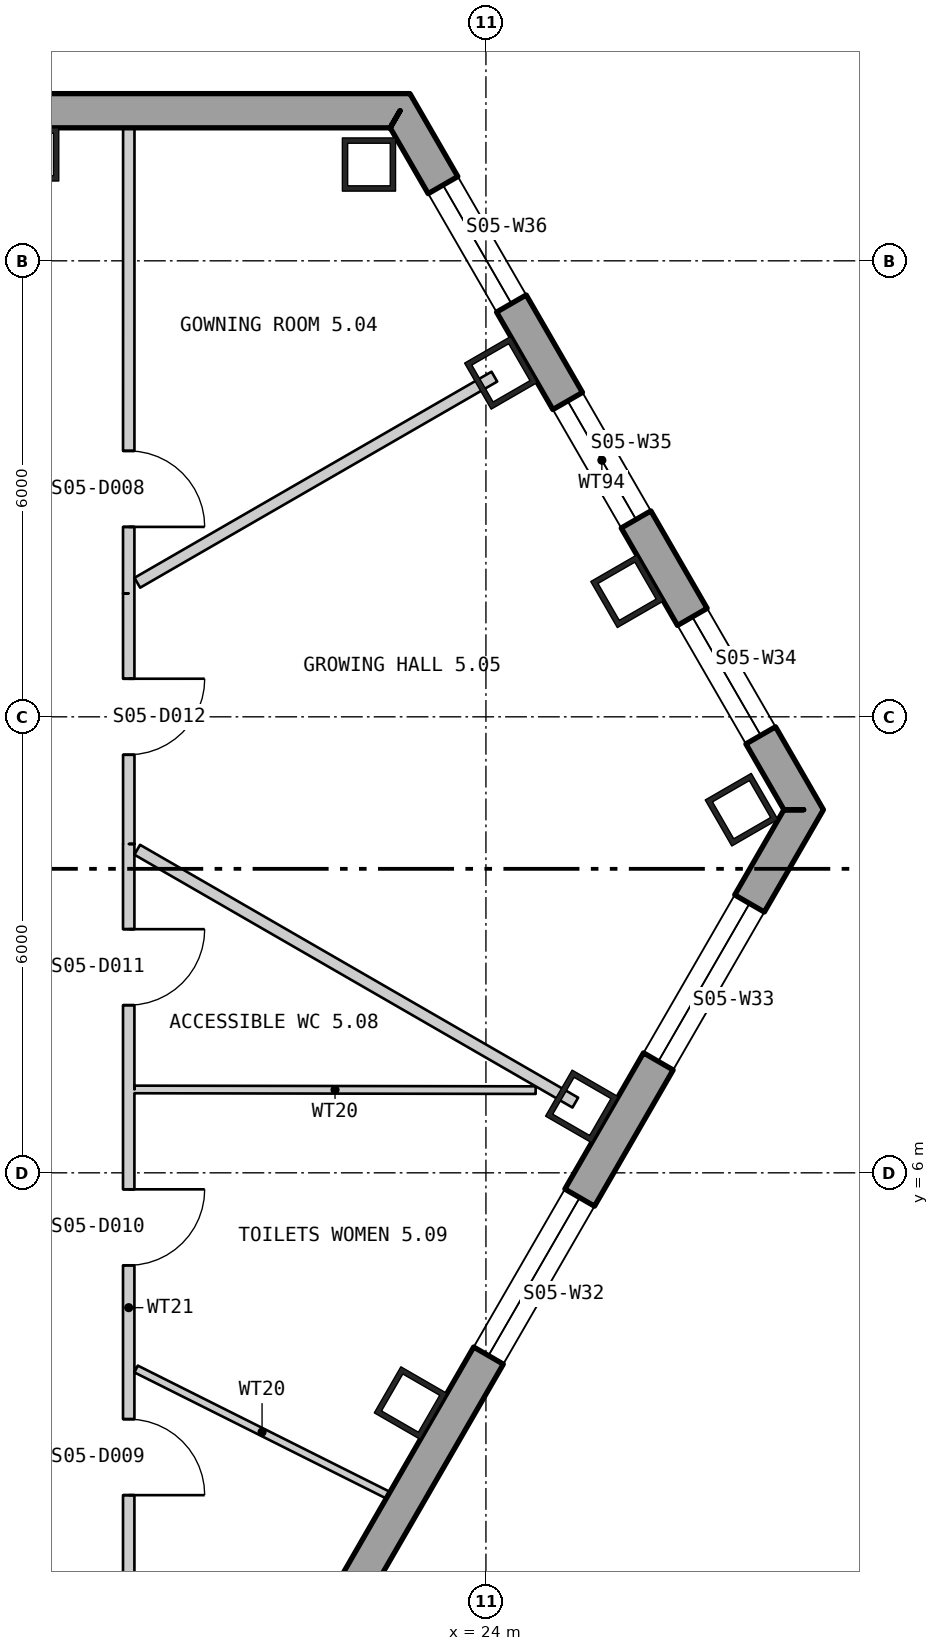
"""IFC4 building model, lengths in metres.
Left out: names, types, materials, properties, quantities, classifications, styles, units other than length and angle.
Written with IfcOpenShell. Run it as: python <this file> out.ifc"""

import sys

from ifc_helpers import new_model, si_unit, direction, frame, frame_2d, origin, origin_2d, place, context, subcontext, project, spatial, polyline, rectangle, hollow_rectangle, outline, extrude, element, fill, save


model = new_model("IFC4")
c1 = context("Model", 3, precision=1e-05, world=origin(), true_north=direction((0.0, 1.0)))
c2 = subcontext(c1, "Body", "Model", "MODEL_VIEW")
j1 = project(units=[si_unit("LENGTHUNIT", "METRE"), si_unit("PLANEANGLEUNIT", "RADIAN")], contexts=[c1])
p1 = place(None, origin())
s1 = spatial("IfcSite", under=j1, at=p1, CompositionType="ELEMENT")
p2 = place(p1, origin())
s2 = spatial("IfcBuilding", under=s1, at=p2, CompositionType="ELEMENT")
p3 = place(p2, frame((0.0, 0.0, 69.3)))
s3 = spatial("IfcBuildingStorey", under=s2, at=p3, CompositionType="ELEMENT", Elevation=69.3)
for number, where, z_axis, x_axis in (
    (1, (22.461, 19.267, 0.0), (0.0, 0.0, 1.0), (-1.0, 0.0, 0.0)),
    (2, (18.03, 19.4, 0.0), (0.0, 0.0, 1.0), (-1.0, 0.0, 0.0)),
    (3, (23.009, 2.97, 0.0), (0.0, 0.0, 1.0), (0.5, 0.866, 0.0)),
    (4, (25.262, 6.874, 0.0), (0.0, 0.0, 1.0), (0.5, 0.866, 0.0)),
    (5, (27.363, 10.778, 0.0), (0.0, 0.0, 1.0), (-0.5, 0.866, 0.0)),
    (6, (25.857, 13.652, 0.0), (0.0, 0.0, 1.0), (-0.5, 0.866, 0.0)),
    (7, (24.197, 16.526, 0.0), (0.0, 0.0, 1.0), (-0.5, 0.866, 0.0)),
):
    element("IfcColumn", number, at=place(p3, frame(where, z_axis=z_axis, x_axis=x_axis)), inside=s3, PredefinedType="COLUMN", context=c2, shape_type="SweptSolid", body=[
        extrude(hollow_rectangle(XDim=0.7, YDim=0.7, WallThickness=0.07, at=origin_2d()), origin(), (0.0, 0.0, 1.0), 4.5),
    ])
p4 = place(p3, frame((22.87, 19.975, -0.4), z_axis=(0.0, 0.0, 1.0), x_axis=(-1.0, 0.0, 0.0)))
e8 = element("IfcWall", 8, at=p4, inside=s3, PredefinedType="SOLIDWALL", context=c2, shape_type="SweptSolid", body=[
    extrude(outline(polyline([(-0.13, -0.225), (45.87, -0.225), (45.61, 0.225), (0.13, 0.225), (-0.13, -0.225)])), origin(), (0.0, 0.0, 1.0), 4.5),
])
p5 = place(p4, frame((5.893, 0.0, 1.3)))
e9 = element("IfcOpeningElement", 9, at=p5, cuts=e8, PredefinedType="OPENING", context=c2, shape_type="SweptSolid", body=[
    extrude(rectangle(XDim=2.4, YDim=2.6, at=frame_2d((1.2, 1.3))), frame((0.0, 0.235, 0.0), z_axis=(0.0, -1.0, 0.0), x_axis=(1.0, 0.0, 0.0)), (0.0, 0.0, 1.0), 0.47),
])
p6 = place(p4, frame((10.401, 0.0, 1.3)))
e10 = element("IfcOpeningElement", 10, at=p6, cuts=e8, PredefinedType="OPENING", context=c2, shape_type="SweptSolid", body=[
    extrude(rectangle(XDim=2.4, YDim=2.6, at=frame_2d((1.2, 1.3))), frame((0.0, 0.235, 0.0), z_axis=(0.0, -1.0, 0.0), x_axis=(1.0, 0.0, 0.0)), (0.0, 0.0, 1.0), 0.47),
])
p7 = place(p4, frame((14.909, 0.0, 1.3)))
e11 = element("IfcOpeningElement", 11, at=p7, cuts=e8, PredefinedType="OPENING", context=c2, shape_type="SweptSolid", body=[
    extrude(rectangle(XDim=2.4, YDim=2.6, at=frame_2d((1.2, 1.3))), frame((0.0, 0.235, 0.0), z_axis=(0.0, -1.0, 0.0), x_axis=(1.0, 0.0, 0.0)), (0.0, 0.0, 1.0), 0.47),
])
p8 = place(p4, frame((19.416, 0.0, 1.3)))
e12 = element("IfcOpeningElement", 12, at=p8, cuts=e8, PredefinedType="OPENING", context=c2, shape_type="SweptSolid", body=[
    extrude(rectangle(XDim=2.4, YDim=2.6, at=frame_2d((1.2, 1.3))), frame((0.0, 0.235, 0.0), z_axis=(0.0, -1.0, 0.0), x_axis=(1.0, 0.0, 0.0)), (0.0, 0.0, 1.0), 0.47),
])
p9 = place(p4, frame((23.924, 0.0, 1.3)))
e13 = element("IfcOpeningElement", 13, at=p9, cuts=e8, PredefinedType="OPENING", context=c2, shape_type="SweptSolid", body=[
    extrude(rectangle(XDim=2.4, YDim=2.6, at=frame_2d((1.2, 1.3))), frame((0.0, 0.235, 0.0), z_axis=(0.0, -1.0, 0.0), x_axis=(1.0, 0.0, 0.0)), (0.0, 0.0, 1.0), 0.47),
])
p10 = place(p4, frame((28.431, 0.0, 1.3)))
e14 = element("IfcOpeningElement", 14, at=p10, cuts=e8, PredefinedType="OPENING", context=c2, shape_type="SweptSolid", body=[
    extrude(rectangle(XDim=2.4, YDim=2.6, at=frame_2d((1.2, 1.3))), frame((0.0, 0.235, 0.0), z_axis=(0.0, -1.0, 0.0), x_axis=(1.0, 0.0, 0.0)), (0.0, 0.0, 1.0), 0.47),
])
p11 = place(p4, frame((32.939, 0.0, 1.3)))
e15 = element("IfcOpeningElement", 15, at=p11, cuts=e8, PredefinedType="OPENING", context=c2, shape_type="SweptSolid", body=[
    extrude(rectangle(XDim=2.4, YDim=2.6, at=frame_2d((1.2, 1.3))), frame((0.0, 0.235, 0.0), z_axis=(0.0, -1.0, 0.0), x_axis=(1.0, 0.0, 0.0)), (0.0, 0.0, 1.0), 0.47),
])
p12 = place(p4, frame((37.447, 0.0, 1.3)))
e16 = element("IfcOpeningElement", 16, at=p12, cuts=e8, PredefinedType="OPENING", context=c2, shape_type="SweptSolid", body=[
    extrude(rectangle(XDim=2.4, YDim=2.6, at=frame_2d((1.2, 1.3))), frame((0.0, 0.235, 0.0), z_axis=(0.0, -1.0, 0.0), x_axis=(1.0, 0.0, 0.0)), (0.0, 0.0, 1.0), 0.47),
])
p13 = place(p3, frame((5.31, -28.834, -0.18), z_axis=(0.0, 0.0, 1.0), x_axis=(0.500000711659, 0.866024992908, 0.0)))
e17 = element("IfcWall", 17, at=p13, inside=s3, PredefinedType="SOLIDWALL", context=c2, shape_type="SweptSolid", body=[
    extrude(outline(polyline([(-0.13, -0.225), (45.87, -0.225), (45.61, 0.225), (0.13, 0.225), (-0.13, -0.225)])), origin(), (0.0, 0.0, 1.0), 4.28),
])
p14 = place(p13, frame((1.424, 0.0, 1.08)))
e18 = element("IfcOpeningElement", 18, at=p14, cuts=e17, PredefinedType="OPENING", context=c2, shape_type="SweptSolid", body=[
    extrude(rectangle(XDim=2.4, YDim=2.6, at=frame_2d((1.2, 1.3))), frame((0.0, 0.235, 0.0), z_axis=(0.0, -1.0, 0.0), x_axis=(1.0, 0.0, 0.0)), (0.0, 0.0, 1.0), 0.47),
])
p15 = place(p13, frame((5.893, 0.0, 1.08)))
e19 = element("IfcOpeningElement", 19, at=p15, cuts=e17, PredefinedType="OPENING", context=c2, shape_type="SweptSolid", body=[
    extrude(rectangle(XDim=2.4, YDim=2.6, at=frame_2d((1.2, 1.3))), frame((0.0, 0.235, 0.0), z_axis=(0.0, -1.0, 0.0), x_axis=(1.0, 0.0, 0.0)), (0.0, 0.0, 1.0), 0.47),
])
p16 = place(p13, frame((10.401, 0.0, 1.08)))
e20 = element("IfcOpeningElement", 20, at=p16, cuts=e17, PredefinedType="OPENING", context=c2, shape_type="SweptSolid", body=[
    extrude(rectangle(XDim=2.4, YDim=2.6, at=frame_2d((1.2, 1.3))), frame((0.0, 0.235, 0.0), z_axis=(0.0, -1.0, 0.0), x_axis=(1.0, 0.0, 0.0)), (0.0, 0.0, 1.0), 0.47),
])
p17 = place(p13, frame((14.909, 0.0, 1.08)))
e21 = element("IfcOpeningElement", 21, at=p17, cuts=e17, PredefinedType="OPENING", context=c2, shape_type="SweptSolid", body=[
    extrude(rectangle(XDim=2.4, YDim=2.6, at=frame_2d((1.2, 1.3))), frame((0.0, 0.235, 0.0), z_axis=(0.0, -1.0, 0.0), x_axis=(1.0, 0.0, 0.0)), (0.0, 0.0, 1.0), 0.47),
])
p18 = place(p13, frame((19.416, 0.0, 1.08)))
e22 = element("IfcOpeningElement", 22, at=p18, cuts=e17, PredefinedType="OPENING", context=c2, shape_type="SweptSolid", body=[
    extrude(rectangle(XDim=2.4, YDim=2.6, at=frame_2d((1.2, 1.3))), frame((0.0, 0.235, 0.0), z_axis=(0.0, -1.0, 0.0), x_axis=(1.0, 0.0, 0.0)), (0.0, 0.0, 1.0), 0.47),
])
p19 = place(p13, frame((23.924, 0.0, 1.08)))
e23 = element("IfcOpeningElement", 23, at=p19, cuts=e17, PredefinedType="OPENING", context=c2, shape_type="SweptSolid", body=[
    extrude(rectangle(XDim=2.4, YDim=2.6, at=frame_2d((1.2, 1.3))), frame((0.0, 0.235, 0.0), z_axis=(0.0, -1.0, 0.0), x_axis=(1.0, 0.0, 0.0)), (0.0, 0.0, 1.0), 0.47),
])
p20 = place(p13, frame((28.431, 0.0, 1.08)))
e24 = element("IfcOpeningElement", 24, at=p20, cuts=e17, PredefinedType="OPENING", context=c2, shape_type="SweptSolid", body=[
    extrude(rectangle(XDim=2.4, YDim=2.6, at=frame_2d((1.2, 1.3))), frame((0.0, 0.235, 0.0), z_axis=(0.0, -1.0, 0.0), x_axis=(1.0, 0.0, 0.0)), (0.0, 0.0, 1.0), 0.47),
])
p21 = place(p13, frame((37.447, 0.0, 1.08)))
e25 = element("IfcOpeningElement", 25, at=p21, cuts=e17, PredefinedType="OPENING", context=c2, shape_type="SweptSolid", body=[
    extrude(rectangle(XDim=2.4, YDim=2.6, at=frame_2d((1.2, 1.3))), frame((0.0, 0.235, 0.0), z_axis=(0.0, -1.0, 0.0), x_axis=(1.0, 0.0, 0.0)), (0.0, 0.0, 1.0), 0.47),
])
p22 = place(p13, frame((41.916, 0.0, 1.08)))
e26 = element("IfcOpeningElement", 26, at=p22, cuts=e17, PredefinedType="OPENING", context=c2, shape_type="SweptSolid", body=[
    extrude(rectangle(XDim=2.4, YDim=2.6, at=frame_2d((1.2, 1.3))), frame((0.0, 0.235, 0.0), z_axis=(0.0, -1.0, 0.0), x_axis=(1.0, 0.0, 0.0)), (0.0, 0.0, 1.0), 0.47),
])
p23 = place(p3, frame((28.18, 10.778, -0.4), z_axis=(0.0, 0.0, 1.0), x_axis=(-0.499998491145, 0.866026274921, 0.0)))
e27 = element("IfcWall", 27, at=p23, inside=s3, PredefinedType="SOLIDWALL", context=c2, shape_type="SweptSolid", body=[
    extrude(outline(polyline([(-0.13, -0.225), (10.75, -0.225), (10.49, 0.225), (0.13, 0.225), (-0.13, -0.225)])), origin(), (0.0, 0.0, 1.0), 4.5),
])
p24 = place(p23, frame((1.13, 0.0, 1.3)))
e28 = element("IfcOpeningElement", 28, at=p24, cuts=e27, PredefinedType="OPENING", context=c2, shape_type="SweptSolid", body=[
    extrude(rectangle(XDim=1.8, YDim=2.6, at=frame_2d((0.9, 1.3))), frame((0.0, 0.235, 0.0), z_axis=(0.0, -1.0, 0.0), x_axis=(1.0, 0.0, 0.0)), (0.0, 0.0, 1.0), 0.47),
])
p25 = place(p23, frame((4.41, 0.0, 1.3)))
e29 = element("IfcOpeningElement", 29, at=p25, cuts=e27, PredefinedType="OPENING", context=c2, shape_type="SweptSolid", body=[
    extrude(rectangle(XDim=1.8, YDim=2.6, at=frame_2d((0.9, 1.3))), frame((0.0, 0.235, 0.0), z_axis=(0.0, -1.0, 0.0), x_axis=(1.0, 0.0, 0.0)), (0.0, 0.0, 1.0), 0.47),
])
p26 = place(p23, frame((7.69, 0.0, 1.3)))
e30 = element("IfcOpeningElement", 30, at=p26, cuts=e27, PredefinedType="OPENING", context=c2, shape_type="SweptSolid", body=[
    extrude(rectangle(XDim=1.8, YDim=2.6, at=frame_2d((0.9, 1.3))), frame((0.0, 0.235, 0.0), z_axis=(0.0, -1.0, 0.0), x_axis=(1.0, 0.0, 0.0)), (0.0, 0.0, 1.0), 0.47),
])
p27 = place(p3, frame((19.3, 13.624, 0.0), z_axis=(0.0, 0.0, 1.0), x_axis=(0.000163238653, 0.999999986677, 0.0)))
e31 = element("IfcWall", 31, at=p27, inside=s3, PredefinedType="PARTITIONING", context=c2, shape_type="SweptSolid", body=[
    extrude(rectangle(XDim=6.126, YDim=0.15, at=frame_2d((3.063, 0.0))), origin(), (0.0, 0.0, 1.0), 4.3),
])
p28 = place(p27, frame((0.875, 0.0, 0.0)))
e32 = element("IfcOpeningElement", 32, at=p28, cuts=e31, PredefinedType="OPENING", context=c2, shape_type="SweptSolid", body=[
    extrude(rectangle(XDim=1.0, YDim=2.1, at=frame_2d((0.5, 1.05))), frame((0.0, 0.085, 0.0), z_axis=(0.0, -1.0, 0.0), x_axis=(1.0, 0.0, 0.0)), (0.0, 0.0, 1.0), 0.17),
])
p29 = place(p3, frame((19.3, -1.875, 0.0), z_axis=(0.0, 0.0, 1.0), x_axis=(0.0, 1.0, 0.0)))
e33 = element("IfcWall", 33, at=p29, inside=s3, PredefinedType="PARTITIONING", context=c2, shape_type="SweptSolid", body=[
    extrude(rectangle(XDim=12.202, YDim=0.15, at=frame_2d((6.101, 0.0))), origin(), (0.0, 0.0, 1.0), 4.3),
])
p30 = place(p29, frame((3.634, 0.0, 0.0)))
e34 = element("IfcOpeningElement", 34, at=p30, cuts=e33, PredefinedType="OPENING", context=c2, shape_type="SweptSolid", body=[
    extrude(rectangle(XDim=1.0, YDim=2.1, at=frame_2d((0.5, 1.05))), frame((0.0, 0.085, 0.0), z_axis=(0.0, -1.0, 0.0), x_axis=(1.0, 0.0, 0.0)), (0.0, 0.0, 1.0), 0.17),
])
p31 = place(p29, frame((6.658, 0.0, 0.0)))
e35 = element("IfcOpeningElement", 35, at=p31, cuts=e33, PredefinedType="OPENING", context=c2, shape_type="SweptSolid", body=[
    extrude(rectangle(XDim=1.0, YDim=2.1, at=frame_2d((0.5, 1.05))), frame((0.0, 0.085, 0.0), z_axis=(0.0, -1.0, 0.0), x_axis=(1.0, 0.0, 0.0)), (0.0, 0.0, 1.0), 0.17),
])
p32 = place(p29, frame((10.081, 0.0, 0.0)))
e36 = element("IfcOpeningElement", 36, at=p32, cuts=e33, PredefinedType="OPENING", context=c2, shape_type="SweptSolid", body=[
    extrude(rectangle(XDim=1.0, YDim=2.1, at=frame_2d((0.5, 1.05))), frame((0.0, 0.085, 0.0), z_axis=(0.0, -1.0, 0.0), x_axis=(1.0, 0.0, 0.0)), (0.0, 0.0, 1.0), 0.17),
])
p33 = place(p3, frame((19.3, 13.624, 0.0), z_axis=(0.0, 0.0, 1.0), x_axis=(0.000303306022, -0.999999954003, 0.0)))
e37 = element("IfcWall", 37, at=p33, inside=s3, PredefinedType="PARTITIONING", context=c2, shape_type="SweptSolid", body=[
    extrude(rectangle(XDim=3.297, YDim=0.15, at=frame_2d((1.649, 0.0))), origin(), (0.0, 0.0, 1.0), 4.3),
])
p34 = place(p33, frame((1.123, 0.0, 0.0)))
e38 = element("IfcOpeningElement", 38, at=p34, cuts=e37, PredefinedType="OPENING", context=c2, shape_type="SweptSolid", body=[
    extrude(rectangle(XDim=1.0, YDim=2.1, at=frame_2d((0.5, 1.05))), frame((0.0, 0.085, 0.0), z_axis=(0.0, -1.0, 0.0), x_axis=(1.0, 0.0, 0.0)), (0.0, 0.0, 1.0), 0.17),
])
p35 = place(p3, frame((19.375, 7.097, 0.0), z_axis=(0.0, 0.0, 1.0), x_axis=(0.999998546715, -0.001704865869, 0.0)))
e39 = element("IfcWall", 39, at=p35, inside=s3, PredefinedType="PARTITIONING", context=c2, shape_type="SweptSolid", body=[
    extrude(rectangle(XDim=5.279, YDim=0.1, at=frame_2d((2.639, 0.0))), origin(), (0.0, 0.0, 1.0), 4.3),
])
p36 = place(p3, frame((19.397, 3.419, 0.0), z_axis=(0.0, 0.0, 1.0), x_axis=(0.894157297607, -0.447752975574, 0.0)))
e40 = element("IfcWall", 40, at=p36, inside=s3, PredefinedType="PARTITIONING", context=c2, shape_type="SweptSolid", body=[
    extrude(rectangle(XDim=3.707, YDim=0.1, at=frame_2d((1.854, 0.0))), origin(), (0.0, 0.0, 1.0), 4.3),
])
p37 = place(p3, frame((19.412, 10.251, 0.0), z_axis=(0.0, 0.0, 1.0), x_axis=(0.866080503844, -0.49990455175, 0.0)))
e41 = element("IfcWall", 41, at=p37, inside=s3, PredefinedType="PARTITIONING", context=c2, shape_type="SweptSolid", body=[
    extrude(rectangle(XDim=6.655, YDim=0.15, at=frame_2d((3.328, 0.0))), origin(), (0.0, 0.0, 1.0), 4.3),
])
p38 = place(p3, frame((19.413, 13.764, 0.0), z_axis=(0.0, 0.0, 1.0), x_axis=(0.866056658381, 0.499945861543, 0.0)))
e42 = element("IfcWall", 42, at=p38, inside=s3, PredefinedType="PARTITIONING", context=c2, shape_type="SweptSolid", body=[
    extrude(rectangle(XDim=5.425, YDim=0.15, at=frame_2d((2.712, 0.0))), origin(), (0.0, 0.0, 1.0), 4.3),
])
p39 = place(p21, origin())
e43 = element("IfcWindow", 43, at=p39, inside=s3, PartitioningType="SINGLE_PANEL", PredefinedType="WINDOW", context=c2, shape_type="SweptSolid", body=[
    extrude(rectangle(XDim=2.4, YDim=2.6, at=frame_2d((1.2, 1.3))), frame((0.0, 0.105, 0.0), z_axis=(0.0, -1.0, 0.0), x_axis=(1.0, 0.0, 0.0)), (0.0, 0.0, 1.0), 0.06),
])
fill(e25, e43)
p40 = place(p22, origin())
e44 = element("IfcWindow", 44, at=p40, inside=s3, PartitioningType="SINGLE_PANEL", PredefinedType="WINDOW", context=c2, shape_type="SweptSolid", body=[
    extrude(rectangle(XDim=2.4, YDim=2.6, at=frame_2d((1.2, 1.3))), frame((0.0, 0.105, 0.0), z_axis=(0.0, -1.0, 0.0), x_axis=(1.0, 0.0, 0.0)), (0.0, 0.0, 1.0), 0.06),
])
fill(e26, e44)
p41 = place(p24, origin())
e45 = element("IfcWindow", 45, at=p41, inside=s3, PartitioningType="SINGLE_PANEL", PredefinedType="WINDOW", context=c2, shape_type="SweptSolid", body=[
    extrude(rectangle(XDim=1.8, YDim=2.6, at=frame_2d((0.9, 1.3))), frame((0.0, 0.105, 0.0), z_axis=(0.0, -1.0, 0.0), x_axis=(1.0, 0.0, 0.0)), (0.0, 0.0, 1.0), 0.06),
])
fill(e28, e45)
p42 = place(p25, origin())
e46 = element("IfcWindow", 46, at=p42, inside=s3, PartitioningType="SINGLE_PANEL", PredefinedType="WINDOW", context=c2, shape_type="SweptSolid", body=[
    extrude(rectangle(XDim=1.8, YDim=2.6, at=frame_2d((0.9, 1.3))), frame((0.0, 0.105, 0.0), z_axis=(0.0, -1.0, 0.0), x_axis=(1.0, 0.0, 0.0)), (0.0, 0.0, 1.0), 0.06),
])
fill(e29, e46)
p43 = place(p26, origin())
e47 = element("IfcWindow", 47, at=p43, inside=s3, PartitioningType="SINGLE_PANEL", PredefinedType="WINDOW", context=c2, shape_type="SweptSolid", body=[
    extrude(rectangle(XDim=1.8, YDim=2.6, at=frame_2d((0.9, 1.3))), frame((0.0, 0.105, 0.0), z_axis=(0.0, -1.0, 0.0), x_axis=(1.0, 0.0, 0.0)), (0.0, 0.0, 1.0), 0.06),
])
fill(e30, e47)
p44 = place(p28, origin())
e48 = element("IfcDoor", 48, at=p44, inside=s3, OperationType="SINGLE_SWING_LEFT", PredefinedType="DOOR", context=c2, shape_type="SweptSolid", body=[
    extrude(rectangle(XDim=1.0, YDim=2.1, at=frame_2d((0.5, 1.05))), frame((0.0, 0.025, 0.0), z_axis=(0.0, -1.0, 0.0), x_axis=(1.0, 0.0, 0.0)), (0.0, 0.0, 1.0), 0.05),
])
fill(e32, e48)
p45 = place(p30, origin())
e49 = element("IfcDoor", 49, at=p45, inside=s3, OperationType="SINGLE_SWING_LEFT", PredefinedType="DOOR", context=c2, shape_type="SweptSolid", body=[
    extrude(rectangle(XDim=1.0, YDim=2.1, at=frame_2d((0.5, 1.05))), frame((0.0, 0.025, 0.0), z_axis=(0.0, -1.0, 0.0), x_axis=(1.0, 0.0, 0.0)), (0.0, 0.0, 1.0), 0.05),
])
fill(e34, e49)
p46 = place(p31, origin())
e50 = element("IfcDoor", 50, at=p46, inside=s3, OperationType="SINGLE_SWING_RIGHT", PredefinedType="DOOR", context=c2, shape_type="SweptSolid", body=[
    extrude(rectangle(XDim=1.0, YDim=2.1, at=frame_2d((0.5, 1.05))), frame((0.0, 0.025, 0.0), z_axis=(0.0, -1.0, 0.0), x_axis=(1.0, 0.0, 0.0)), (0.0, 0.0, 1.0), 0.05),
])
fill(e35, e50)
p47 = place(p32, origin())
e51 = element("IfcDoor", 51, at=p47, inside=s3, OperationType="SINGLE_SWING_RIGHT", PredefinedType="DOOR", context=c2, shape_type="SweptSolid", body=[
    extrude(rectangle(XDim=1.0, YDim=2.1, at=frame_2d((0.5, 1.05))), frame((0.0, 0.025, 0.0), z_axis=(0.0, -1.0, 0.0), x_axis=(1.0, 0.0, 0.0)), (0.0, 0.0, 1.0), 0.05),
])
fill(e36, e51)
p48 = place(p34, origin())
e52 = element("IfcDoor", 52, at=p48, inside=s3, OperationType="SINGLE_SWING_RIGHT", PredefinedType="DOOR", context=c2, shape_type="SweptSolid", body=[
    extrude(rectangle(XDim=1.0, YDim=2.1, at=frame_2d((0.5, 1.05))), frame((0.0, 0.025, 0.0), z_axis=(0.0, -1.0, 0.0), x_axis=(1.0, 0.0, 0.0)), (0.0, 0.0, 1.0), 0.05),
])
fill(e38, e52)
save(model, sys.argv[1])
